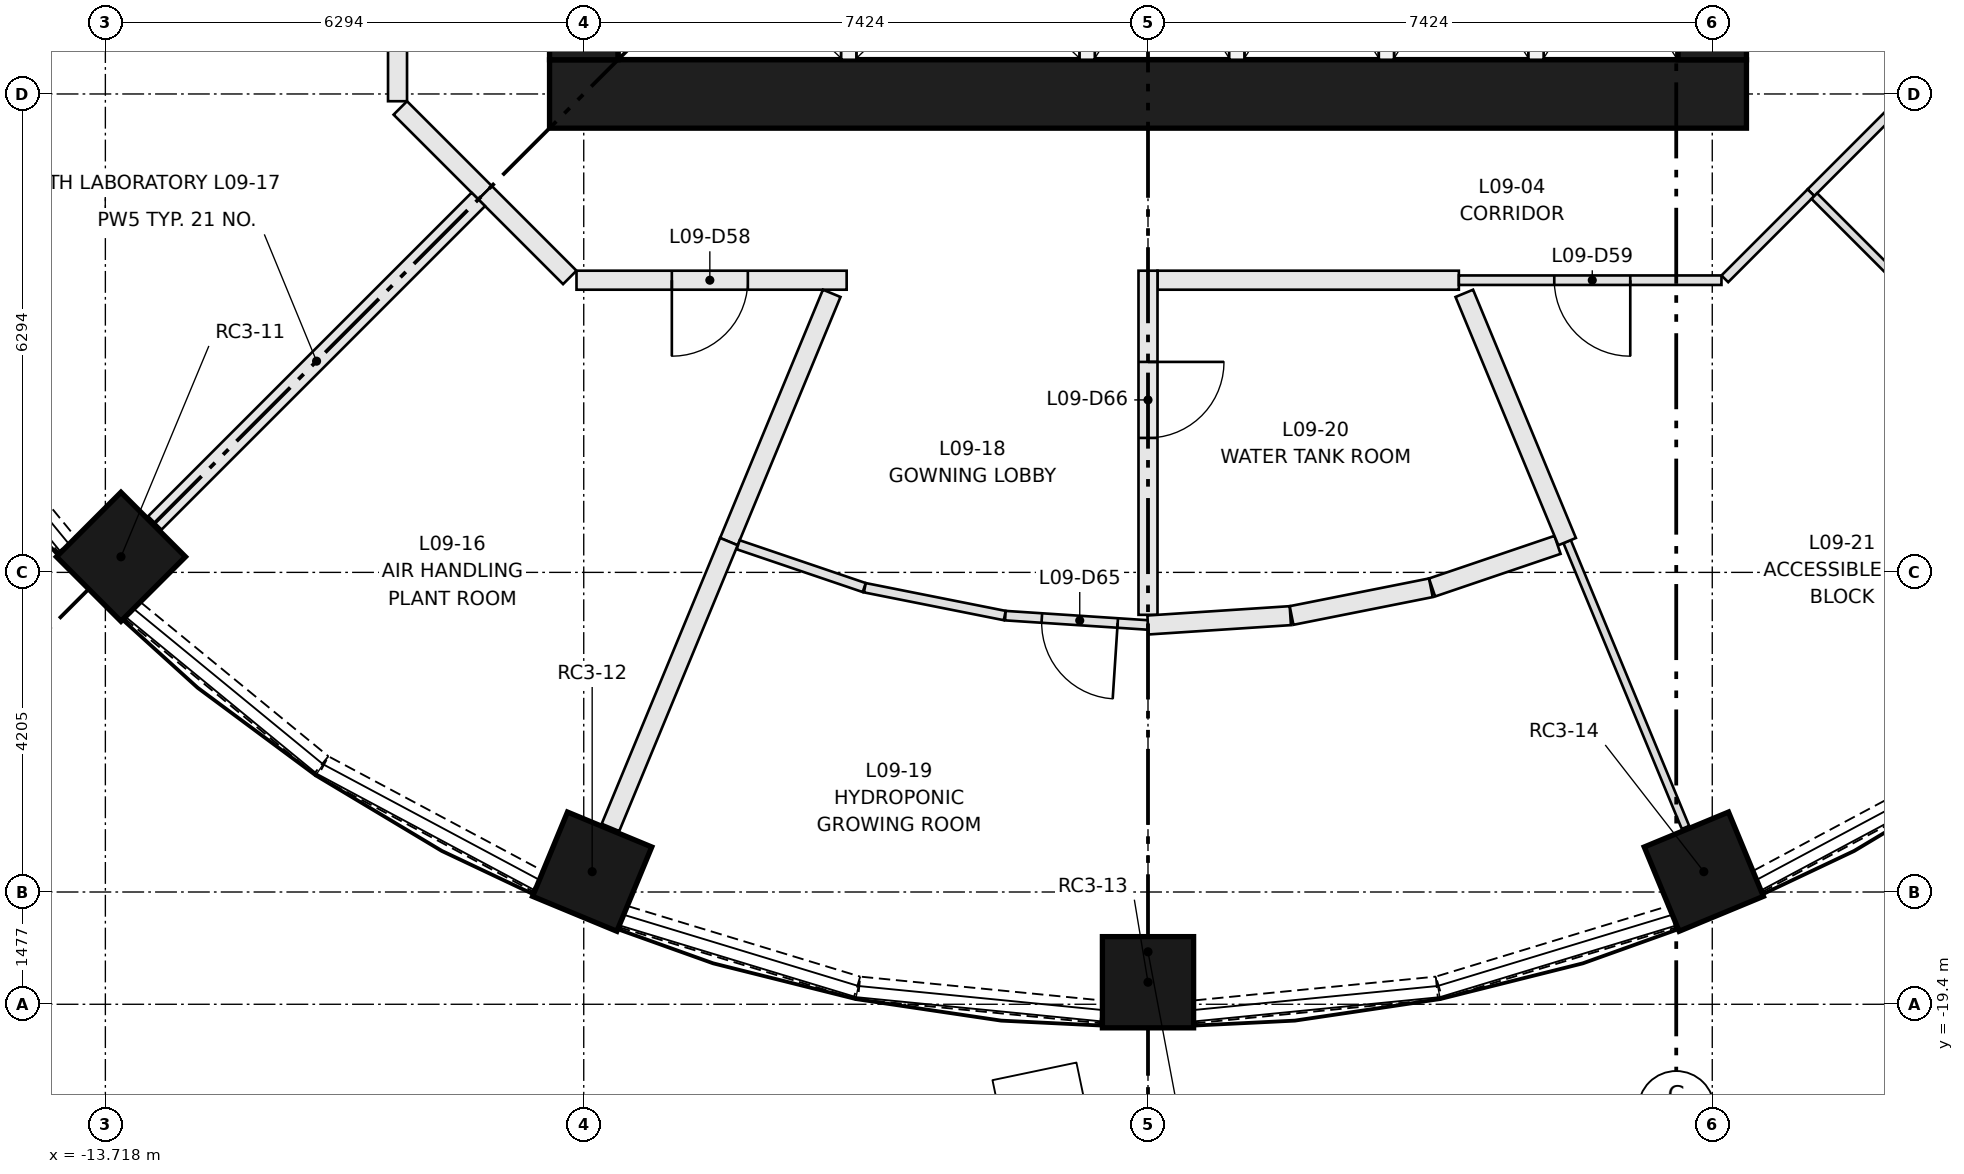
"""IFC4 building model, lengths in metres.
Left out: names, types, materials, properties, quantities, classifications, styles, units other than length and angle.
Written with IfcOpenShell. Run it as: python <this file> out.ifc"""

import sys

from ifc_helpers import new_model, si_unit, direction, frame, frame_2d, origin, origin_2d, place, context, subcontext, project, spatial, rectangle, extrude, element, fill, save


model = new_model("IFC4")
c1 = context("Model", 3, precision=1e-05, world=origin(), true_north=direction((0.0, 1.0)))
c2 = subcontext(c1, "Body", "Model", "MODEL_VIEW")
j1 = project(units=[si_unit("LENGTHUNIT", "METRE"), si_unit("PLANEANGLEUNIT", "RADIAN")], contexts=[c1])
p1 = place(None, origin())
s1 = spatial("IfcSite", under=j1, at=p1, CompositionType="ELEMENT")
p2 = place(p1, origin())
s2 = spatial("IfcBuilding", under=s1, at=p2, CompositionType="ELEMENT")
p3 = place(p2, frame((0.0, 0.0, 37.15)))
s3 = spatial("IfcBuildingStorey", under=s2, at=p3, CompositionType="ELEMENT", Elevation=37.15)
for number, where, z_axis, x_axis in (
    (1, (-13.513, -13.513, 0.0), (0.0, 0.0, 1.0), (-0.707, -0.707, 0.0)),
    (2, (-7.313, -17.655, 0.0), (0.0, 0.0, 1.0), (-0.383, -0.924, 0.0)),
    (3, (0.0, -19.11, 0.0), (0.0, 0.0, 1.0), (0.0, -1.0, 0.0)),
    (4, (7.313, -17.655, 0.0), (0.0, 0.0, 1.0), (0.383, -0.924, 0.0)),
):
    element("IfcColumn", number, at=place(p3, frame(where, z_axis=z_axis, x_axis=x_axis)), inside=s3, PredefinedType="COLUMN", context=c2, shape_type="SweptSolid", body=[
        extrude(rectangle(XDim=1.2, YDim=1.2, at=origin_2d()), origin(), (0.0, 0.0, 1.0), 3.65),
    ])
p4 = place(p3, frame((-7.874, -7.424, 0.0), z_axis=(0.0, 0.0, 1.0), x_axis=(1.0, 0.0, 0.0)))
e5 = element("IfcWall", 5, at=p4, inside=s3, PredefinedType="SHEAR", context=c2, shape_type="SweptSolid", body=[
    extrude(rectangle(XDim=15.748, YDim=0.9, at=frame_2d((7.874, 0.0))), origin(), (0.0, 0.0, 1.0), 3.65),
])
p5 = place(p3, frame((-7.424, -6.974, 0.0), z_axis=(0.0, 0.0, 1.0), x_axis=(0.0, 1.0, 0.0)))
e6 = element("IfcWall", 6, at=p5, inside=s3, PredefinedType="SHEAR", context=c2, shape_type="SweptSolid", body=[
    extrude(rectangle(XDim=13.948, YDim=0.9, at=frame_2d((6.974, 0.0))), origin(), (0.0, 0.0, 1.0), 3.65),
])
p6 = place(p5, frame((6.474, 0.0, 0.0)))
e7 = element("IfcOpeningElement", 7, at=p6, cuts=e6, PredefinedType="OPENING", context=c2, shape_type="SweptSolid", body=[
    extrude(rectangle(XDim=1.0, YDim=2.1, at=frame_2d((0.5, 1.05))), frame((0.0, 0.46, 0.0), z_axis=(0.0, -1.0, 0.0), x_axis=(1.0, 0.0, 0.0)), (0.0, 0.0, 1.0), 0.92),
])
p7 = place(p5, frame((3.35, 0.0, 0.0)))
e8 = element("IfcOpeningElement", 8, at=p7, cuts=e6, PredefinedType="OPENING", context=c2, shape_type="SweptSolid", body=[
    extrude(rectangle(XDim=1.8, YDim=2.1, at=frame_2d((0.9, 1.05))), frame((0.0, 0.46, 0.0), z_axis=(0.0, -1.0, 0.0), x_axis=(1.0, 0.0, 0.0)), (0.0, 0.0, 1.0), 0.92),
])
p8 = place(p5, frame((8.799, 0.0, 0.0)))
e9 = element("IfcOpeningElement", 9, at=p8, cuts=e6, PredefinedType="OPENING", context=c2, shape_type="SweptSolid", body=[
    extrude(rectangle(XDim=1.8, YDim=2.1, at=frame_2d((0.9, 1.05))), frame((0.0, 0.46, 0.0), z_axis=(0.0, -1.0, 0.0), x_axis=(1.0, 0.0, 0.0)), (0.0, 0.0, 1.0), 0.92),
])
p9 = place(p5, frame((11.974, 0.0, 0.0)))
e10 = element("IfcOpeningElement", 10, at=p9, cuts=e6, PredefinedType="OPENING", context=c2, shape_type="SweptSolid", body=[
    extrude(rectangle(XDim=1.0, YDim=2.1, at=frame_2d((0.5, 1.05))), frame((0.0, 0.46, 0.0), z_axis=(0.0, -1.0, 0.0), x_axis=(1.0, 0.0, 0.0)), (0.0, 0.0, 1.0), 0.92),
])
p10 = place(p3, frame((7.424, -6.974, 0.0), z_axis=(0.0, 0.0, 1.0), x_axis=(0.0, 1.0, 0.0)))
e11 = element("IfcWall", 11, at=p10, inside=s3, PredefinedType="SHEAR", context=c2, shape_type="SweptSolid", body=[
    extrude(rectangle(XDim=13.948, YDim=0.9, at=frame_2d((6.974, 0.0))), origin(), (0.0, 0.0, 1.0), 3.65),
])
p11 = place(p10, frame((6.474, 0.0, 0.0)))
e12 = element("IfcOpeningElement", 12, at=p11, cuts=e11, PredefinedType="OPENING", context=c2, shape_type="SweptSolid", body=[
    extrude(rectangle(XDim=1.0, YDim=2.1, at=frame_2d((0.5, 1.05))), frame((0.0, 0.46, 0.0), z_axis=(0.0, -1.0, 0.0), x_axis=(1.0, 0.0, 0.0)), (0.0, 0.0, 1.0), 0.92),
])
p12 = place(p10, frame((3.35, 0.0, 0.0)))
e13 = element("IfcOpeningElement", 13, at=p12, cuts=e11, PredefinedType="OPENING", context=c2, shape_type="SweptSolid", body=[
    extrude(rectangle(XDim=1.8, YDim=2.1, at=frame_2d((0.9, 1.05))), frame((0.0, 0.46, 0.0), z_axis=(0.0, -1.0, 0.0), x_axis=(1.0, 0.0, 0.0)), (0.0, 0.0, 1.0), 0.92),
])
p13 = place(p10, frame((8.799, 0.0, 0.0)))
e14 = element("IfcOpeningElement", 14, at=p13, cuts=e11, PredefinedType="OPENING", context=c2, shape_type="SweptSolid", body=[
    extrude(rectangle(XDim=1.8, YDim=2.1, at=frame_2d((0.9, 1.05))), frame((0.0, 0.46, 0.0), z_axis=(0.0, -1.0, 0.0), x_axis=(1.0, 0.0, 0.0)), (0.0, 0.0, 1.0), 0.92),
])
for number, where, z_axis, x_axis in (
    (15, (-3.937, -6.974, 0.0), (0.0, 0.0, 1.0), (0.0, 1.0, 0.0)),
    (16, (-0.8, -6.974, 0.0), (0.0, 0.0, 1.0), (0.0, 1.0, 0.0)),
    (17, (1.168, -6.974, 0.0), (0.0, 0.0, 1.0), (0.0, 1.0, 0.0)),
    (18, (3.137, -6.974, 0.0), (0.0, 0.0, 1.0), (0.0, 1.0, 0.0)),
    (19, (5.105, -6.974, 0.0), (0.0, 0.0, 1.0), (0.0, 1.0, 0.0)),
):
    element("IfcWall", number, at=place(p3, frame(where, z_axis=z_axis, x_axis=x_axis)), inside=s3, PredefinedType="PARTITIONING", context=c2, shape_type="SweptSolid", body=[
        extrude(rectangle(XDim=2.8, YDim=0.2, at=frame_2d((1.4, 0.0))), origin(), (0.0, 0.0, 1.0), 3.3),
    ])
for number, where, z_axis, x_axis in (
    (20, (-16.253, -10.879, 0.0), (0.0, 0.0, 1.0), (0.634, -0.773, 0.0)),
    (21, (-13.354, -14.222, 0.0), (0.0, 0.0, 1.0), (0.773, -0.634, 0.0)),
):
    element("IfcWall", number, at=place(p3, frame(where, z_axis=z_axis, x_axis=x_axis)), inside=s3, PredefinedType="SOLIDWALL", context=c2, shape_type="SweptSolid", body=[
        extrude(rectangle(XDim=3.202, YDim=0.3, at=frame_2d((1.601, 0.0))), origin(), (0.0, 0.0, 1.0), 0.9),
    ])
p14 = place(p3, frame((-10.854, -16.27, 0.0), z_axis=(0.0, 0.0, 1.0), x_axis=(0.881981372243, -0.471284265614, 0.0)))
e22 = element("IfcWall", 22, at=p14, inside=s3, PredefinedType="SOLIDWALL", context=c2, shape_type="SweptSolid", body=[
    extrude(rectangle(XDim=3.204, YDim=0.3, at=frame_2d((1.602, 0.0))), origin(), (0.0, 0.0, 1.0), 0.9),
])
p15 = place(p3, frame((-6.895, -18.25, 0.0), z_axis=(0.0, 0.0, 1.0), x_axis=(0.956883225512, -0.290472877795, 0.0)))
e23 = element("IfcWall", 23, at=p15, inside=s3, PredefinedType="SOLIDWALL", context=c2, shape_type="SweptSolid", body=[
    extrude(rectangle(XDim=3.202, YDim=0.3, at=frame_2d((1.601, 0.0))), origin(), (0.0, 0.0, 1.0), 0.9),
])
for number, where, z_axis, x_axis in (
    (24, (-3.801, -19.186, 0.0), (0.0, 0.0, 1.0), (0.995, -0.098, 0.0)),
    (25, (0.613, -19.5, 0.0), (0.0, 0.0, 1.0), (0.995, 0.098, 0.0)),
):
    element("IfcWall", number, at=place(p3, frame(where, z_axis=z_axis, x_axis=x_axis)), inside=s3, PredefinedType="SOLIDWALL", context=c2, shape_type="SweptSolid", body=[
        extrude(rectangle(XDim=3.204, YDim=0.3, at=frame_2d((1.602, 0.0))), origin(), (0.0, 0.0, 1.0), 0.9),
    ])
p16 = place(p3, frame((3.83, -19.18, 0.0), z_axis=(0.0, 0.0, 1.0), x_axis=(0.956883225512, 0.290472877795, 0.0)))
e26 = element("IfcWall", 26, at=p16, inside=s3, PredefinedType="SOLIDWALL", context=c2, shape_type="SweptSolid", body=[
    extrude(rectangle(XDim=3.202, YDim=0.3, at=frame_2d((1.601, 0.0))), origin(), (0.0, 0.0, 1.0), 0.9),
])
p17 = place(p3, frame((8.028, -17.78, 0.0), z_axis=(0.0, 0.0, 1.0), x_axis=(0.881981372243, 0.471284265614, 0.0)))
e27 = element("IfcWall", 27, at=p17, inside=s3, PredefinedType="SOLIDWALL", context=c2, shape_type="SweptSolid", body=[
    extrude(rectangle(XDim=3.204, YDim=0.3, at=frame_2d((1.602, 0.0))), origin(), (0.0, 0.0, 1.0), 0.9),
])
p18 = place(p3, frame((9.856, -7.589, 0.0), z_axis=(0.0, 0.0, 1.0), x_axis=(-0.70718294931, -0.707030604857, 0.0)))
e28 = element("IfcWall", 28, at=p18, inside=s3, PredefinedType="PARTITIONING", context=c2, shape_type="SweptSolid", body=[
    extrude(rectangle(XDim=1.603, YDim=0.125, at=frame_2d((0.801, 0.0))), origin(), (0.0, 0.0, 1.0), 3.3),
])
p19 = place(p3, frame((-9.874, -7.519, 0.0), z_axis=(0.0, 0.0, 1.0), x_axis=(0.0, 1.0, 0.0)))
e29 = element("IfcWall", 29, at=p19, inside=s3, PredefinedType="PARTITIONING", context=c2, shape_type="SweptSolid", body=[
    extrude(rectangle(XDim=3.429, YDim=0.25, at=frame_2d((1.715, 0.0))), origin(), (0.0, 0.0, 1.0), 3.3),
])
p20 = place(p19, frame((1.2, 0.0, 0.0)))
e30 = element("IfcOpeningElement", 30, at=p20, cuts=e29, PredefinedType="OPENING", context=c2, shape_type="SweptSolid", body=[
    extrude(rectangle(XDim=1.0, YDim=2.1, at=frame_2d((0.5, 1.05))), frame((0.0, 0.135, 0.0), z_axis=(0.0, -1.0, 0.0), x_axis=(1.0, 0.0, 0.0)), (0.0, 0.0, 1.0), 0.27),
])
for number, where, z_axis, x_axis in (
    (31, (-8.722, -8.722, 0.0), (0.0, 0.0, 1.0), (-0.707, 0.707, 0.0)),
    (32, (-7.608, -9.837, 0.0), (0.0, 0.0, 1.0), (-0.707, 0.707, 0.0)),
):
    element("IfcWall", number, at=place(p3, frame(where, z_axis=z_axis, x_axis=x_axis)), inside=s3, PredefinedType="PARTITIONING", context=c2, shape_type="SweptSolid", body=[
        extrude(rectangle(XDim=1.577, YDim=0.25, at=frame_2d((0.788, 0.0))), origin(), (0.0, 0.0, 1.0), 3.3),
    ])
p21 = place(p3, frame((-3.965, -9.874, 0.0), z_axis=(0.0, 0.0, 1.0), x_axis=(-1.0, 0.0, 0.0)))
e33 = element("IfcWall", 33, at=p21, inside=s3, PredefinedType="PARTITIONING", context=c2, shape_type="SweptSolid", body=[
    extrude(rectangle(XDim=3.554, YDim=0.25, at=frame_2d((1.777, 0.0))), origin(), (0.0, 0.0, 1.0), 3.3),
])
p22 = place(p21, frame((1.3, 0.0, 0.0)))
e34 = element("IfcOpeningElement", 34, at=p22, cuts=e33, PredefinedType="OPENING", context=c2, shape_type="SweptSolid", body=[
    extrude(rectangle(XDim=1.0, YDim=2.1, at=frame_2d((0.5, 1.05))), frame((0.0, 0.135, 0.0), z_axis=(0.0, -1.0, 0.0), x_axis=(1.0, 0.0, 0.0)), (0.0, 0.0, 1.0), 0.27),
])
p23 = place(p3, frame((4.09, -9.874, 0.0), z_axis=(0.0, 0.0, 1.0), x_axis=(-1.0, 0.0, 0.0)))
e35 = element("IfcWall", 35, at=p23, inside=s3, PredefinedType="PARTITIONING", context=c2, shape_type="SweptSolid", body=[
    extrude(rectangle(XDim=3.965, YDim=0.25, at=frame_2d((1.982, 0.0))), origin(), (0.0, 0.0, 1.0), 3.3),
])
p24 = place(p3, frame((7.545, -9.874, 0.0), z_axis=(0.0, 0.0, 1.0), x_axis=(-1.0, 0.0, 0.0)))
e36 = element("IfcWall", 36, at=p24, inside=s3, PredefinedType="PARTITIONING", context=c2, shape_type="SweptSolid", body=[
    extrude(rectangle(XDim=3.455, YDim=0.125, at=frame_2d((1.728, 0.0))), origin(), (0.0, 0.0, 1.0), 3.3),
])
p25 = place(p24, frame((1.2, 0.0, 0.0)))
e37 = element("IfcOpeningElement", 37, at=p25, cuts=e36, PredefinedType="OPENING", context=c2, shape_type="SweptSolid", body=[
    extrude(rectangle(XDim=1.0, YDim=2.1, at=frame_2d((0.5, 1.05))), frame((0.0, 0.073, 0.0), z_axis=(0.0, -1.0, 0.0), x_axis=(1.0, 0.0, 0.0)), (0.0, 0.0, 1.0), 0.145),
])
p26 = place(p3, frame((8.722, -8.722, 0.0), z_axis=(0.0, 0.0, 1.0), x_axis=(-0.707030604857, -0.70718294931, 0.0)))
e38 = element("IfcWall", 38, at=p26, inside=s3, PredefinedType="PARTITIONING", context=c2, shape_type="SweptSolid", body=[
    extrude(rectangle(XDim=1.603, YDim=0.125, at=frame_2d((0.801, 0.0))), origin(), (0.0, 0.0, 1.0), 3.3),
])
p27 = place(p3, frame((-13.313, -5.514, 0.0), z_axis=(0.0, 0.0, 1.0), x_axis=(-0.923873536763, -0.382697907061, 0.0)))
e39 = element("IfcWall", 39, at=p27, inside=s3, PredefinedType="PARTITIONING", context=c2, shape_type="SweptSolid", body=[
    extrude(rectangle(XDim=4.07, YDim=0.25, at=frame_2d((2.035, 0.0))), origin(), (0.0, 0.0, 1.0), 3.3),
])
p28 = place(p3, frame((-13.067, -13.067, 0.0), z_axis=(0.0, 0.0, 1.0), x_axis=(0.707106781187, 0.707106781187, 0.0)))
e40 = element("IfcWall", 40, at=p28, inside=s3, PredefinedType="PARTITIONING", context=c2, shape_type="SweptSolid", body=[
    extrude(rectangle(XDim=6.02, YDim=0.25, at=frame_2d((3.01, 0.0))), origin(), (0.0, 0.0, 1.0), 3.3),
])
p29 = place(p3, frame((-4.162, -10.047, 0.0), z_axis=(0.0, 0.0, 1.0), x_axis=(-0.382662857696, -0.92388805455, 0.0)))
e41 = element("IfcWall", 41, at=p29, inside=s3, PredefinedType="PARTITIONING", context=c2, shape_type="SweptSolid", body=[
    extrude(rectangle(XDim=3.535, YDim=0.25, at=frame_2d((1.768, 0.0))), origin(), (0.0, 0.0, 1.0), 3.3),
])
p30 = place(p3, frame((-5.514, -13.313, 0.0), z_axis=(0.0, 0.0, 1.0), x_axis=(-0.382697907061, -0.923873536763, 0.0)))
e42 = element("IfcWall", 42, at=p30, inside=s3, PredefinedType="PARTITIONING", context=c2, shape_type="SweptSolid", body=[
    extrude(rectangle(XDim=4.07, YDim=0.25, at=frame_2d((2.035, 0.0))), origin(), (0.0, 0.0, 1.0), 3.3),
])
p31 = place(p3, frame((-3.733, -13.918, 0.0), z_axis=(0.0, 0.0, 1.0), x_axis=(-0.946926428718, 0.321450367234, 0.0)))
e43 = element("IfcWall", 43, at=p31, inside=s3, PredefinedType="PARTITIONING", context=c2, shape_type="SweptSolid", body=[
    extrude(rectangle(XDim=1.751, YDim=0.125, at=frame_2d((0.876, 0.0))), origin(), (0.0, 0.0, 1.0), 3.3),
])
p32 = place(p3, frame((-1.885, -14.286, 0.0), z_axis=(0.0, 0.0, 1.0), x_axis=(-0.980800221705, 0.19501519198, 0.0)))
e44 = element("IfcWall", 44, at=p32, inside=s3, PredefinedType="PARTITIONING", context=c2, shape_type="SweptSolid", body=[
    extrude(rectangle(XDim=1.877, YDim=0.125, at=frame_2d((0.938, 0.0))), origin(), (0.0, 0.0, 1.0), 3.3),
])
p33 = place(p3, frame((0.0, -14.41, 0.0), z_axis=(0.0, 0.0, 1.0), x_axis=(-0.997865971163, 0.065295509756, 0.0)))
e45 = element("IfcWall", 45, at=p33, inside=s3, PredefinedType="PARTITIONING", context=c2, shape_type="SweptSolid", body=[
    extrude(rectangle(XDim=1.881, YDim=0.125, at=frame_2d((0.94, 0.0))), origin(), (0.0, 0.0, 1.0), 3.3),
])
p34 = place(p33, frame((0.4, 0.0, 0.0)))
e46 = element("IfcOpeningElement", 46, at=p34, cuts=e45, PredefinedType="OPENING", context=c2, shape_type="SweptSolid", body=[
    extrude(rectangle(XDim=1.0, YDim=2.1, at=frame_2d((0.5, 1.05))), frame((0.0, 0.073, 0.0), z_axis=(0.0, -1.0, 0.0), x_axis=(1.0, 0.0, 0.0)), (0.0, 0.0, 1.0), 0.145),
])
p35 = place(p3, frame((0.0, -9.749, 0.0), z_axis=(0.0, 0.0, 1.0), x_axis=(0.0, -1.0, 0.0)))
e47 = element("IfcWall", 47, at=p35, inside=s3, PredefinedType="PARTITIONING", context=c2, shape_type="SweptSolid", body=[
    extrude(rectangle(XDim=4.528, YDim=0.25, at=frame_2d((2.264, 0.0))), origin(), (0.0, 0.0, 1.0), 3.3),
])
p36 = place(p35, frame((1.2, 0.0, 0.0)))
e48 = element("IfcOpeningElement", 48, at=p36, cuts=e47, PredefinedType="OPENING", context=c2, shape_type="SweptSolid", body=[
    extrude(rectangle(XDim=1.0, YDim=2.1, at=frame_2d((0.5, 1.05))), frame((0.0, 0.135, 0.0), z_axis=(0.0, -1.0, 0.0), x_axis=(1.0, 0.0, 0.0)), (0.0, 0.0, 1.0), 0.27),
])
p37 = place(p3, frame((0.0, -14.41, 0.0), z_axis=(0.0, 0.0, 1.0), x_axis=(0.997857088285, 0.065431119203, 0.0)))
e49 = element("IfcWall", 49, at=p37, inside=s3, PredefinedType="PARTITIONING", context=c2, shape_type="SweptSolid", body=[
    extrude(rectangle(XDim=1.877, YDim=0.25, at=frame_2d((0.938, 0.0))), origin(), (0.0, 0.0, 1.0), 3.3),
])
p38 = place(p3, frame((1.889, -14.285, 0.0), z_axis=(0.0, 0.0, 1.0), x_axis=(0.980791158232, 0.195060769847, 0.0)))
e50 = element("IfcWall", 50, at=p38, inside=s3, PredefinedType="PARTITIONING", context=c2, shape_type="SweptSolid", body=[
    extrude(rectangle(XDim=1.869, YDim=0.25, at=frame_2d((0.934, 0.0))), origin(), (0.0, 0.0, 1.0), 3.3),
])
p39 = place(p3, frame((3.737, -13.917, 0.0), z_axis=(0.0, 0.0, 1.0), x_axis=(0.946889634804, 0.321558734138, 0.0)))
e51 = element("IfcWall", 51, at=p39, inside=s3, PredefinedType="PARTITIONING", context=c2, shape_type="SweptSolid", body=[
    extrude(rectangle(XDim=1.743, YDim=0.25, at=frame_2d((0.872, 0.0))), origin(), (0.0, 0.0, 1.0), 3.3),
])
p40 = place(p3, frame((5.514, -13.313, 0.0), z_axis=(0.0, 0.0, 1.0), x_axis=(0.382697907061, -0.923873536763, 0.0)))
e52 = element("IfcWall", 52, at=p40, inside=s3, PredefinedType="PARTITIONING", context=c2, shape_type="SweptSolid", body=[
    extrude(rectangle(XDim=4.07, YDim=0.105, at=frame_2d((2.035, 0.0))), origin(), (0.0, 0.0, 1.0), 3.3),
])
p41 = place(p3, frame((4.162, -10.047, 0.0), z_axis=(0.0, 0.0, 1.0), x_axis=(0.382662857696, -0.92388805455, 0.0)))
e53 = element("IfcWall", 53, at=p41, inside=s3, PredefinedType="PARTITIONING", context=c2, shape_type="SweptSolid", body=[
    extrude(rectangle(XDim=3.535, YDim=0.25, at=frame_2d((1.768, 0.0))), origin(), (0.0, 0.0, 1.0), 3.3),
])
p42 = place(p3, frame((8.767, -8.767, 0.0), z_axis=(0.0, 0.0, 1.0), x_axis=(0.707106781187, -0.707106781187, 0.0)))
e54 = element("IfcWall", 54, at=p42, inside=s3, PredefinedType="PARTITIONING", context=c2, shape_type="SweptSolid", body=[
    extrude(rectangle(XDim=6.082, YDim=0.105, at=frame_2d((3.041, 0.0))), origin(), (0.0, 0.0, 1.0), 3.3),
])
p43 = place(p22, origin())
e55 = element("IfcDoor", 55, at=p43, inside=s3, OperationType="SINGLE_SWING_RIGHT", PredefinedType="DOOR", context=c2, shape_type="SweptSolid", body=[
    extrude(rectangle(XDim=1.0, YDim=2.1, at=frame_2d((0.5, 1.05))), frame((0.0, 0.025, 0.0), z_axis=(0.0, -1.0, 0.0), x_axis=(1.0, 0.0, 0.0)), (0.0, 0.0, 1.0), 0.05),
])
fill(e34, e55)
p44 = place(p25, origin())
e56 = element("IfcDoor", 56, at=p44, inside=s3, OperationType="SINGLE_SWING_LEFT", PredefinedType="DOOR", context=c2, shape_type="SweptSolid", body=[
    extrude(rectangle(XDim=1.0, YDim=2.1, at=frame_2d((0.5, 1.05))), frame((0.0, 0.025, 0.0), z_axis=(0.0, -1.0, 0.0), x_axis=(1.0, 0.0, 0.0)), (0.0, 0.0, 1.0), 0.05),
])
fill(e37, e56)
p45 = place(p34, origin())
e57 = element("IfcDoor", 57, at=p45, inside=s3, OperationType="SINGLE_SWING_LEFT", PredefinedType="DOOR", context=c2, shape_type="SweptSolid", body=[
    extrude(rectangle(XDim=1.0, YDim=2.1, at=frame_2d((0.5, 1.05))), frame((0.0, 0.025, 0.0), z_axis=(0.0, -1.0, 0.0), x_axis=(1.0, 0.0, 0.0)), (0.0, 0.0, 1.0), 0.05),
])
fill(e46, e57)
p46 = place(p36, origin())
e58 = element("IfcDoor", 58, at=p46, inside=s3, OperationType="SINGLE_SWING_LEFT", PredefinedType="DOOR", context=c2, shape_type="SweptSolid", body=[
    extrude(rectangle(XDim=1.0, YDim=2.1, at=frame_2d((0.5, 1.05))), frame((0.0, 0.025, 0.0), z_axis=(0.0, -1.0, 0.0), x_axis=(1.0, 0.0, 0.0)), (0.0, 0.0, 1.0), 0.05),
])
fill(e48, e58)
save(model, sys.argv[1])
